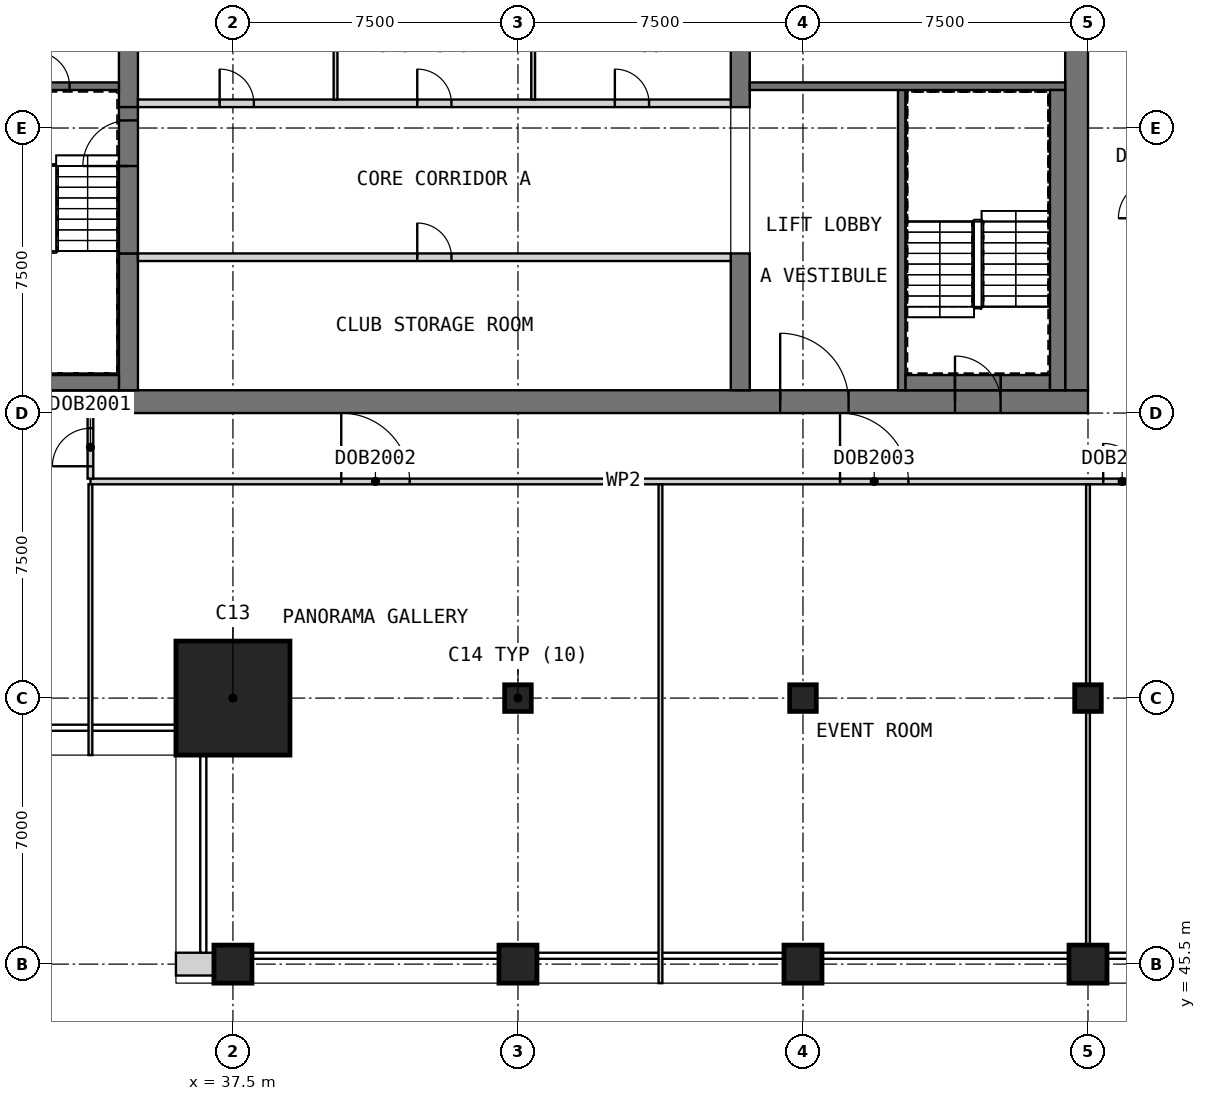
"""IFC4 building model, lengths in metres.
Left out: names, types, materials, properties, quantities, classifications, styles, units other than length and angle.
Written with IfcOpenShell. Run it as: python <this file> out.ifc"""

import sys

from ifc_helpers import new_model, si_unit, direction, frame, frame_2d, origin, origin_2d, place, context, subcontext, project, spatial, rectangle, extrude, element, fill, save


model = new_model("IFC4")
c1 = context("Model", 3, precision=1e-05, world=origin(), true_north=direction((0.0, 1.0)))
c2 = subcontext(c1, "Body", "Model", "MODEL_VIEW")
j1 = project(units=[si_unit("LENGTHUNIT", "METRE"), si_unit("PLANEANGLEUNIT", "RADIAN")], contexts=[c1])
p1 = place(None, origin())
s1 = spatial("IfcSite", under=j1, at=p1, CompositionType="ELEMENT")
p2 = place(p1, origin())
s2 = spatial("IfcBuilding", under=s1, at=p2, CompositionType="ELEMENT")
p3 = place(p2, frame((0.0, 0.0, 308.7)))
s3 = spatial("IfcBuildingStorey", under=s2, at=p3, CompositionType="ELEMENT", Elevation=308.7)
for number, where, z_axis, x_axis in (
    (1, (37.5, 45.5, 0.0), (0.0, 0.0, 1.0), (1.0, 0.0, 0.0)),
    (2, (45.0, 45.5, 0.0), (0.0, 0.0, 1.0), (1.0, 0.0, 0.0)),
):
    element("IfcColumn", number, at=place(p3, frame(where, z_axis=z_axis, x_axis=x_axis)), inside=s3, PredefinedType="COLUMN", context=c2, shape_type="SweptSolid", body=[
        extrude(rectangle(XDim=1.0, YDim=1.0, at=origin_2d()), origin(), (0.0, 0.0, 1.0), 6.0),
    ])
p4 = place(p3, frame((45.0, 52.5, 0.0), z_axis=(0.0, 0.0, 1.0), x_axis=(1.0, 0.0, 0.0)))
e3 = element("IfcColumn", 3, at=p4, inside=s3, PredefinedType="COLUMN", context=c2, shape_type="SweptSolid", body=[
    extrude(rectangle(XDim=0.7, YDim=0.7, at=origin_2d()), origin(), (0.0, 0.0, 1.0), 6.0),
])
p5 = place(p3, frame((52.5, 45.5, 0.0), z_axis=(0.0, 0.0, 1.0), x_axis=(1.0, 0.0, 0.0)))
e4 = element("IfcColumn", 4, at=p5, inside=s3, PredefinedType="COLUMN", context=c2, shape_type="SweptSolid", body=[
    extrude(rectangle(XDim=1.0, YDim=1.0, at=origin_2d()), origin(), (0.0, 0.0, 1.0), 6.0),
])
p6 = place(p3, frame((52.5, 52.5, 0.0), z_axis=(0.0, 0.0, 1.0), x_axis=(1.0, 0.0, 0.0)))
e5 = element("IfcColumn", 5, at=p6, inside=s3, PredefinedType="COLUMN", context=c2, shape_type="SweptSolid", body=[
    extrude(rectangle(XDim=0.7, YDim=0.7, at=origin_2d()), origin(), (0.0, 0.0, 1.0), 6.0),
])
p7 = place(p3, frame((60.0, 45.5, 0.0), z_axis=(0.0, 0.0, 1.0), x_axis=(1.0, 0.0, 0.0)))
e6 = element("IfcColumn", 6, at=p7, inside=s3, PredefinedType="COLUMN", context=c2, shape_type="SweptSolid", body=[
    extrude(rectangle(XDim=1.0, YDim=1.0, at=origin_2d()), origin(), (0.0, 0.0, 1.0), 6.0),
])
p8 = place(p3, frame((60.0, 52.5, 0.0), z_axis=(0.0, 0.0, 1.0), x_axis=(1.0, 0.0, 0.0)))
e7 = element("IfcColumn", 7, at=p8, inside=s3, PredefinedType="COLUMN", context=c2, shape_type="SweptSolid", body=[
    extrude(rectangle(XDim=0.7, YDim=0.7, at=origin_2d()), origin(), (0.0, 0.0, 1.0), 6.0),
])
p9 = place(p3, frame((37.5, 52.5, 0.0), z_axis=(0.0, 0.0, 1.0), x_axis=(1.0, 0.0, 0.0)))
e8 = element("IfcColumn", 8, at=p9, inside=s3, PredefinedType="COLUMN", context=c2, shape_type="SweptSolid", body=[
    extrude(rectangle(XDim=3.0, YDim=3.0, at=origin_2d()), origin(), (0.0, 0.0, 1.0), 6.0),
])
p10 = place(p3, frame((30.0, 60.3, 0.0), z_axis=(0.0, 0.0, 1.0), x_axis=(1.0, 0.0, 0.0)))
e9 = element("IfcWall", 9, at=p10, inside=s3, PredefinedType="SHEAR", context=c2, shape_type="SweptSolid", body=[
    extrude(rectangle(XDim=30.0, YDim=0.6, at=frame_2d((15.0, 0.0))), origin(), (0.0, 0.0, 1.0), 6.0),
])
p11 = place(p10, frame((21.9, 0.0, 0.0)))
e10 = element("IfcOpeningElement", 10, at=p11, cuts=e9, PredefinedType="OPENING", context=c2, shape_type="SweptSolid", body=[
    extrude(rectangle(XDim=1.8, YDim=2.1, at=frame_2d((0.9, 1.05))), frame((0.0, 0.31, 0.0), z_axis=(0.0, -1.0, 0.0), x_axis=(1.0, 0.0, 0.0)), (0.0, 0.0, 1.0), 0.62),
])
p12 = place(p10, frame((26.5, 0.0, 0.0)))
e11 = element("IfcOpeningElement", 11, at=p12, cuts=e9, PredefinedType="OPENING", context=c2, shape_type="SweptSolid", body=[
    extrude(rectangle(XDim=1.2, YDim=2.1, at=frame_2d((0.6, 1.05))), frame((0.0, 0.31, 0.0), z_axis=(0.0, -1.0, 0.0), x_axis=(1.0, 0.0, 0.0)), (0.0, 0.0, 1.0), 0.62),
])
p13 = place(p3, frame((59.7, 60.6, 0.0), z_axis=(0.0, 0.0, 1.0), x_axis=(0.0, 1.0, 0.0)))
e12 = element("IfcWall", 12, at=p13, inside=s3, PredefinedType="SHEAR", context=c2, shape_type="SweptSolid", body=[
    extrude(rectangle(XDim=21.3, YDim=0.6, at=frame_2d((10.65, 0.0))), origin(), (0.0, 0.0, 1.0), 6.0),
])
p14 = place(p13, frame((14.9, 0.0, 0.0)))
e13 = element("IfcOpeningElement", 13, at=p14, cuts=e12, PredefinedType="OPENING", context=c2, shape_type="SweptSolid", body=[
    extrude(rectangle(XDim=1.8, YDim=2.1, at=frame_2d((0.9, 1.05))), frame((0.0, 0.31, 0.0), z_axis=(0.0, -1.0, 0.0), x_axis=(1.0, 0.0, 0.0)), (0.0, 0.0, 1.0), 0.62),
])
p15 = place(p3, frame((34.75, 60.6, 0.0), z_axis=(0.0, 0.0, 1.0), x_axis=(0.0, 1.0, 0.0)))
e14 = element("IfcWall", 14, at=p15, inside=s3, PredefinedType="SHEAR", context=c2, shape_type="SweptSolid", body=[
    extrude(rectangle(XDim=3.6, YDim=0.5, at=frame_2d((1.8, 0.0))), origin(), (0.0, 0.0, 1.0), 6.0),
])
p16 = place(p3, frame((34.75, 68.05, 0.0), z_axis=(0.0, 0.0, 1.0), x_axis=(0.0, 1.0, 0.0)))
e15 = element("IfcWall", 15, at=p16, inside=s3, PredefinedType="SHEAR", context=c2, shape_type="SweptSolid", body=[
    extrude(rectangle(XDim=6.4, YDim=0.5, at=frame_2d((3.2, 0.0))), origin(), (0.0, 0.0, 1.0), 6.0),
])
p17 = place(p3, frame((50.85, 60.6, 0.0), z_axis=(0.0, 0.0, 1.0), x_axis=(0.0, 1.0, 0.0)))
e16 = element("IfcWall", 16, at=p17, inside=s3, PredefinedType="SHEAR", context=c2, shape_type="SweptSolid", body=[
    extrude(rectangle(XDim=3.6, YDim=0.5, at=frame_2d((1.8, 0.0))), origin(), (0.0, 0.0, 1.0), 6.0),
])
p18 = place(p3, frame((50.85, 68.05, 0.0), z_axis=(0.0, 0.0, 1.0), x_axis=(0.0, 1.0, 0.0)))
e17 = element("IfcWall", 17, at=p18, inside=s3, PredefinedType="SHEAR", context=c2, shape_type="SweptSolid", body=[
    extrude(rectangle(XDim=6.4, YDim=0.5, at=frame_2d((3.2, 0.0))), origin(), (0.0, 0.0, 1.0), 6.0),
])
p19 = place(p3, frame((36.0, 45.5, 0.0), z_axis=(0.0, 0.0, 1.0), x_axis=(1.0, 0.0, 0.0)))
e18 = element("IfcWall", 18, at=p19, inside=s3, PredefinedType="SOLIDWALL", context=c2, shape_type="SweptSolid", body=[
    extrude(rectangle(XDim=1.0, YDim=0.6, at=frame_2d((0.5, 0.0))), origin(), (0.0, 0.0, 1.0), 5.6),
])
p20 = place(p3, frame((35.0, 64.1, 0.0), z_axis=(0.0, 0.0, 1.0), x_axis=(1.0, 0.0, 0.0)))
e19 = element("IfcWall", 19, at=p20, inside=s3, PredefinedType="PARTITIONING", context=c2, shape_type="SweptSolid", body=[
    extrude(rectangle(XDim=15.6, YDim=0.2, at=frame_2d((7.8, 0.0))), origin(), (0.0, 0.0, 1.0), 5.59),
])
p21 = place(p20, frame((7.35, 0.0, 0.0)))
e20 = element("IfcOpeningElement", 20, at=p21, cuts=e19, PredefinedType="OPENING", context=c2, shape_type="SweptSolid", body=[
    extrude(rectangle(XDim=0.9, YDim=2.1, at=frame_2d((0.45, 1.05))), frame((0.0, 0.11, 0.0), z_axis=(0.0, -1.0, 0.0), x_axis=(1.0, 0.0, 0.0)), (0.0, 0.0, 1.0), 0.22),
])
p22 = place(p3, frame((35.0, 68.15, 0.0), z_axis=(0.0, 0.0, 1.0), x_axis=(1.0, 0.0, 0.0)))
e21 = element("IfcWall", 21, at=p22, inside=s3, PredefinedType="PARTITIONING", context=c2, shape_type="SweptSolid", body=[
    extrude(rectangle(XDim=15.6, YDim=0.2, at=frame_2d((7.8, 0.0))), origin(), (0.0, 0.0, 1.0), 5.59),
])
p23 = place(p22, frame((2.15, 0.0, 0.0)))
e22 = element("IfcOpeningElement", 22, at=p23, cuts=e21, PredefinedType="OPENING", context=c2, shape_type="SweptSolid", body=[
    extrude(rectangle(XDim=0.9, YDim=2.1, at=frame_2d((0.45, 1.05))), frame((0.0, 0.11, 0.0), z_axis=(0.0, -1.0, 0.0), x_axis=(1.0, 0.0, 0.0)), (0.0, 0.0, 1.0), 0.22),
])
p24 = place(p22, frame((7.35, 0.0, 0.0)))
e23 = element("IfcOpeningElement", 23, at=p24, cuts=e21, PredefinedType="OPENING", context=c2, shape_type="SweptSolid", body=[
    extrude(rectangle(XDim=0.9, YDim=2.1, at=frame_2d((0.45, 1.05))), frame((0.0, 0.11, 0.0), z_axis=(0.0, -1.0, 0.0), x_axis=(1.0, 0.0, 0.0)), (0.0, 0.0, 1.0), 0.22),
])
p25 = place(p22, frame((12.55, 0.0, 0.0)))
e24 = element("IfcOpeningElement", 24, at=p25, cuts=e21, PredefinedType="OPENING", context=c2, shape_type="SweptSolid", body=[
    extrude(rectangle(XDim=0.9, YDim=2.1, at=frame_2d((0.45, 1.05))), frame((0.0, 0.11, 0.0), z_axis=(0.0, -1.0, 0.0), x_axis=(1.0, 0.0, 0.0)), (0.0, 0.0, 1.0), 0.22),
])
for number, where, z_axis, x_axis in (
    (25, (40.2, 68.25, 0.0), (0.0, 0.0, 1.0), (0.0, 1.0, 0.0)),
    (26, (45.4, 68.25, 0.0), (0.0, 0.0, 1.0), (0.0, 1.0, 0.0)),
):
    element("IfcWall", number, at=place(p3, frame(where, z_axis=z_axis, x_axis=x_axis)), inside=s3, PredefinedType="PARTITIONING", context=c2, shape_type="SweptSolid", body=[
        extrude(rectangle(XDim=2.75, YDim=0.1, at=frame_2d((1.375, 0.0))), origin(), (0.0, 0.0, 1.0), 5.59),
    ])
p26 = place(p3, frame((34.75, 64.2, 0.0), z_axis=(0.0, 0.0, 1.0), x_axis=(0.0, 1.0, 0.0)))
e27 = element("IfcWall", 27, at=p26, inside=s3, PredefinedType="SOLIDWALL", context=c2, shape_type="SweptSolid", body=[
    extrude(rectangle(XDim=3.85, YDim=0.5, at=frame_2d((1.925, 0.0))), origin(), (0.0, 0.0, 1.0), 4.8),
])
p27 = place(p26, frame((2.3, 0.0, 0.0)))
e28 = element("IfcOpeningElement", 28, at=p27, cuts=e27, PredefinedType="OPENING", context=c2, shape_type="SweptSolid", body=[
    extrude(rectangle(XDim=1.2, YDim=2.1, at=frame_2d((0.6, 1.05))), frame((0.0, 0.26, 0.0), z_axis=(0.0, -1.0, 0.0), x_axis=(1.0, 0.0, 0.0)), (0.0, 0.0, 1.0), 0.52),
])
p28 = place(p3, frame((30.6, 68.6, 0.0), z_axis=(0.0, 0.0, 1.0), x_axis=(1.0, 0.0, 0.0)))
e29 = element("IfcWall", 29, at=p28, inside=s3, PredefinedType="SOLIDWALL", context=c2, shape_type="SweptSolid", body=[
    extrude(rectangle(XDim=3.9, YDim=0.2, at=frame_2d((1.95, 0.0))), origin(), (0.0, 0.0, 1.0), 5.59),
])
p29 = place(p28, frame((1.7, 0.0, 0.0)))
e30 = element("IfcOpeningElement", 30, at=p29, cuts=e29, PredefinedType="OPENING", context=c2, shape_type="SweptSolid", body=[
    extrude(rectangle(XDim=0.9, YDim=2.1, at=frame_2d((0.45, 1.05))), frame((0.0, 0.11, 0.0), z_axis=(0.0, -1.0, 0.0), x_axis=(1.0, 0.0, 0.0)), (0.0, 0.0, 1.0), 0.22),
])
p30 = place(p3, frame((55.1, 60.6, 0.0), z_axis=(0.0, 0.0, 1.0), x_axis=(0.0, 1.0, 0.0)))
e31 = element("IfcWall", 31, at=p30, inside=s3, PredefinedType="SOLIDWALL", context=c2, shape_type="SweptSolid", body=[
    extrude(rectangle(XDim=8.0, YDim=0.2, at=frame_2d((4.0, 0.0))), origin(), (0.0, 0.0, 1.0), 5.59),
])
p31 = place(p3, frame((51.1, 68.6, 0.0), z_axis=(0.0, 0.0, 1.0), x_axis=(1.0, 0.0, 0.0)))
e32 = element("IfcWall", 32, at=p31, inside=s3, PredefinedType="SOLIDWALL", context=c2, shape_type="SweptSolid", body=[
    extrude(rectangle(XDim=8.3, YDim=0.2, at=frame_2d((4.15, 0.0))), origin(), (0.0, 0.0, 1.0), 5.59),
])
p32 = place(p3, frame((31.0, 60.8, 0.0), z_axis=(0.0, 0.0, 1.0), x_axis=(1.0, 0.0, 0.0)))
e33 = element("IfcWall", 33, at=p32, inside=s3, PredefinedType="SOLIDWALL", context=c2, shape_type="SweptSolid", body=[
    extrude(rectangle(XDim=3.5, YDim=0.4, at=frame_2d((1.75, 0.0))), origin(), (0.0, 0.0, 1.0), 5.59),
])
for number, where, z_axis, x_axis in (
    (34, (55.2, 60.8, 0.0), (0.0, 0.0, 1.0), (1.0, 0.0, 0.0)),
    (35, (57.7, 60.8, 0.0), (0.0, 0.0, 1.0), (1.0, 0.0, 0.0)),
):
    element("IfcWall", number, at=place(p3, frame(where, z_axis=z_axis, x_axis=x_axis)), inside=s3, PredefinedType="SOLIDWALL", context=c2, shape_type="SweptSolid", body=[
        extrude(rectangle(XDim=1.3, YDim=0.4, at=frame_2d((0.65, 0.0))), origin(), (0.0, 0.0, 1.0), 5.59),
    ])
p33 = place(p3, frame((59.2, 60.6, 0.0), z_axis=(0.0, 0.0, 1.0), x_axis=(0.0, 1.0, 0.0)))
e36 = element("IfcWall", 36, at=p33, inside=s3, PredefinedType="SOLIDWALL", context=c2, shape_type="SweptSolid", body=[
    extrude(rectangle(XDim=7.9, YDim=0.4, at=frame_2d((3.95, 0.0))), origin(), (0.0, 0.0, 1.0), 5.59),
])
p34 = place(p3, frame((56.5, 60.8, 3.24), z_axis=(0.0, 0.0, 1.0), x_axis=(1.0, 0.0, 0.0)))
e37 = element("IfcWall", 37, at=p34, inside=s3, PredefinedType="SOLIDWALL", context=c2, shape_type="SweptSolid", body=[
    extrude(rectangle(XDim=1.2, YDim=0.4, at=frame_2d((0.6, 0.0))), origin(), (0.0, 0.0, 1.0), 2.35),
])
p35 = place(p3, frame((33.75, 58.2, 0.0), z_axis=(0.0, 0.0, 1.0), x_axis=(1.0, 0.0, 0.0)))
e38 = element("IfcWall", 38, at=p35, inside=s3, PredefinedType="PARTITIONING", context=c2, shape_type="SweptSolid", body=[
    extrude(rectangle(XDim=28.05, YDim=0.15, at=frame_2d((14.025, 0.0))), origin(), (0.0, 0.0, 1.0), 5.6),
])
p36 = place(p35, frame((6.6, 0.0, 0.0)))
e39 = element("IfcOpeningElement", 39, at=p36, cuts=e38, PredefinedType="OPENING", context=c2, shape_type="SweptSolid", body=[
    extrude(rectangle(XDim=1.8, YDim=2.1, at=frame_2d((0.9, 1.05))), frame((0.0, 0.085, 0.0), z_axis=(0.0, -1.0, 0.0), x_axis=(1.0, 0.0, 0.0)), (0.0, 0.0, 1.0), 0.17),
])
p37 = place(p35, frame((19.725, 0.0, 0.0)))
e40 = element("IfcOpeningElement", 40, at=p37, cuts=e38, PredefinedType="OPENING", context=c2, shape_type="SweptSolid", body=[
    extrude(rectangle(XDim=1.8, YDim=2.1, at=frame_2d((0.9, 1.05))), frame((0.0, 0.085, 0.0), z_axis=(0.0, -1.0, 0.0), x_axis=(1.0, 0.0, 0.0)), (0.0, 0.0, 1.0), 0.17),
])
p38 = place(p35, frame((26.65, 0.0, 0.0)))
e41 = element("IfcOpeningElement", 41, at=p38, cuts=e38, PredefinedType="OPENING", context=c2, shape_type="SweptSolid", body=[
    extrude(rectangle(XDim=1.0, YDim=2.1, at=frame_2d((0.5, 1.05))), frame((0.0, 0.085, 0.0), z_axis=(0.0, -1.0, 0.0), x_axis=(1.0, 0.0, 0.0)), (0.0, 0.0, 1.0), 0.17),
])
p39 = place(p3, frame((33.75, 58.275, 0.0), z_axis=(0.0, 0.0, 1.0), x_axis=(0.0, 1.0, 0.0)))
e42 = element("IfcWall", 42, at=p39, inside=s3, PredefinedType="PARTITIONING", context=c2, shape_type="SweptSolid", body=[
    extrude(rectangle(XDim=1.725, YDim=0.15, at=frame_2d((0.863, 0.0))), origin(), (0.0, 0.0, 1.0), 5.6),
])
p40 = place(p39, frame((0.325, 0.0, 0.0)))
e43 = element("IfcOpeningElement", 43, at=p40, cuts=e42, PredefinedType="OPENING", context=c2, shape_type="SweptSolid", body=[
    extrude(rectangle(XDim=1.0, YDim=2.1, at=frame_2d((0.5, 1.05))), frame((0.0, 0.085, 0.0), z_axis=(0.0, -1.0, 0.0), x_axis=(1.0, 0.0, 0.0)), (0.0, 0.0, 1.0), 0.17),
])
p41 = place(p3, frame((33.75, 51.0, 0.0), z_axis=(0.0, 0.0, 1.0), x_axis=(0.0, 1.0, 0.0)))
e44 = element("IfcWall", 44, at=p41, inside=s3, PredefinedType="PARTITIONING", context=c2, shape_type="SweptSolid", body=[
    extrude(rectangle(XDim=7.125, YDim=0.1, at=frame_2d((3.562, 0.0))), origin(), (0.0, 0.0, 1.0), 5.6),
])
for number, where, z_axis, x_axis in (
    (45, (48.75, 45.0, 0.0), (0.0, 0.0, 1.0), (0.0, 1.0, 0.0)),
    (46, (60.0, 45.0, 0.0), (0.0, 0.0, 1.0), (0.0, 1.0, 0.0)),
):
    element("IfcWall", number, at=place(p3, frame(where, z_axis=z_axis, x_axis=x_axis)), inside=s3, PredefinedType="PARTITIONING", context=c2, shape_type="SweptSolid", body=[
        extrude(rectangle(XDim=13.125, YDim=0.1, at=frame_2d((6.562, 0.0))), origin(), (0.0, 0.0, 1.0), 5.6),
    ])
p42 = place(p21, origin())
e47 = element("IfcDoor", 47, at=p42, inside=s3, OperationType="SINGLE_SWING_RIGHT", PredefinedType="DOOR", context=c2, shape_type="SweptSolid", body=[
    extrude(rectangle(XDim=0.9, YDim=2.1, at=frame_2d((0.45, 1.05))), frame((0.0, 0.025, 0.0), z_axis=(0.0, -1.0, 0.0), x_axis=(1.0, 0.0, 0.0)), (0.0, 0.0, 1.0), 0.05),
])
fill(e20, e47)
p43 = place(p23, origin())
e48 = element("IfcDoor", 48, at=p43, inside=s3, OperationType="SINGLE_SWING_RIGHT", PredefinedType="DOOR", context=c2, shape_type="SweptSolid", body=[
    extrude(rectangle(XDim=0.9, YDim=2.1, at=frame_2d((0.45, 1.05))), frame((0.0, 0.025, 0.0), z_axis=(0.0, -1.0, 0.0), x_axis=(1.0, 0.0, 0.0)), (0.0, 0.0, 1.0), 0.05),
])
fill(e22, e48)
p44 = place(p24, origin())
e49 = element("IfcDoor", 49, at=p44, inside=s3, OperationType="SINGLE_SWING_LEFT", PredefinedType="DOOR", context=c2, shape_type="SweptSolid", body=[
    extrude(rectangle(XDim=0.9, YDim=2.1, at=frame_2d((0.45, 1.05))), frame((0.0, 0.025, 0.0), z_axis=(0.0, -1.0, 0.0), x_axis=(1.0, 0.0, 0.0)), (0.0, 0.0, 1.0), 0.05),
])
fill(e23, e49)
p45 = place(p25, origin())
e50 = element("IfcDoor", 50, at=p45, inside=s3, OperationType="SINGLE_SWING_RIGHT", PredefinedType="DOOR", context=c2, shape_type="SweptSolid", body=[
    extrude(rectangle(XDim=0.9, YDim=2.1, at=frame_2d((0.45, 1.05))), frame((0.0, 0.025, 0.0), z_axis=(0.0, -1.0, 0.0), x_axis=(1.0, 0.0, 0.0)), (0.0, 0.0, 1.0), 0.05),
])
fill(e24, e50)
p46 = place(p11, origin())
e51 = element("IfcDoor", 51, at=p46, inside=s3, OperationType="DOUBLE_DOOR_SINGLE_SWING", PredefinedType="DOOR", context=c2, shape_type="SweptSolid", body=[
    extrude(rectangle(XDim=1.8, YDim=2.1, at=frame_2d((0.9, 1.05))), frame((0.0, 0.025, 0.0), z_axis=(0.0, -1.0, 0.0), x_axis=(1.0, 0.0, 0.0)), (0.0, 0.0, 1.0), 0.05),
])
fill(e10, e51)
p47 = place(p27, origin())
e52 = element("IfcDoor", 52, at=p47, inside=s3, OperationType="SINGLE_SWING_LEFT", PredefinedType="DOOR", context=c2, shape_type="SweptSolid", body=[
    extrude(rectangle(XDim=1.2, YDim=2.1, at=frame_2d((0.6, 1.05))), frame((0.0, 0.025, 0.0), z_axis=(0.0, -1.0, 0.0), x_axis=(1.0, 0.0, 0.0)), (0.0, 0.0, 1.0), 0.05),
])
fill(e28, e52)
p48 = place(p29, origin())
e53 = element("IfcDoor", 53, at=p48, inside=s3, OperationType="SINGLE_SWING_LEFT", PredefinedType="DOOR", context=c2, shape_type="SweptSolid", body=[
    extrude(rectangle(XDim=0.9, YDim=2.1, at=frame_2d((0.45, 1.05))), frame((0.0, 0.025, 0.0), z_axis=(0.0, -1.0, 0.0), x_axis=(1.0, 0.0, 0.0)), (0.0, 0.0, 1.0), 0.05),
])
fill(e30, e53)
p49 = place(p12, origin())
e54 = element("IfcDoor", 54, at=p49, inside=s3, OperationType="SINGLE_SWING_LEFT", PredefinedType="DOOR", context=c2, shape_type="SweptSolid", body=[
    extrude(rectangle(XDim=1.2, YDim=2.1, at=frame_2d((0.6, 1.05))), frame((0.0, 0.025, 0.0), z_axis=(0.0, -1.0, 0.0), x_axis=(1.0, 0.0, 0.0)), (0.0, 0.0, 1.0), 0.05),
])
fill(e11, e54)
p50 = place(p40, origin())
e55 = element("IfcDoor", 55, at=p50, inside=s3, OperationType="SINGLE_SWING_RIGHT", PredefinedType="DOOR", context=c2, shape_type="SweptSolid", body=[
    extrude(rectangle(XDim=1.0, YDim=2.1, at=frame_2d((0.5, 1.05))), frame((0.0, 0.025, 0.0), z_axis=(0.0, -1.0, 0.0), x_axis=(1.0, 0.0, 0.0)), (0.0, 0.0, 1.0), 0.05),
])
fill(e43, e55)
p51 = place(p36, origin())
e56 = element("IfcDoor", 56, at=p51, inside=s3, OperationType="DOUBLE_DOOR_SINGLE_SWING", PredefinedType="DOOR", context=c2, shape_type="SweptSolid", body=[
    extrude(rectangle(XDim=1.8, YDim=2.1, at=frame_2d((0.9, 1.05))), frame((0.0, 0.025, 0.0), z_axis=(0.0, -1.0, 0.0), x_axis=(1.0, 0.0, 0.0)), (0.0, 0.0, 1.0), 0.05),
])
fill(e39, e56)
p52 = place(p37, origin())
e57 = element("IfcDoor", 57, at=p52, inside=s3, OperationType="DOUBLE_DOOR_SINGLE_SWING", PredefinedType="DOOR", context=c2, shape_type="SweptSolid", body=[
    extrude(rectangle(XDim=1.8, YDim=2.1, at=frame_2d((0.9, 1.05))), frame((0.0, 0.025, 0.0), z_axis=(0.0, -1.0, 0.0), x_axis=(1.0, 0.0, 0.0)), (0.0, 0.0, 1.0), 0.05),
])
fill(e40, e57)
p53 = place(p38, origin())
e58 = element("IfcDoor", 58, at=p53, inside=s3, OperationType="SINGLE_SWING_RIGHT", PredefinedType="DOOR", context=c2, shape_type="SweptSolid", body=[
    extrude(rectangle(XDim=1.0, YDim=2.1, at=frame_2d((0.5, 1.05))), frame((0.0, 0.025, 0.0), z_axis=(0.0, -1.0, 0.0), x_axis=(1.0, 0.0, 0.0)), (0.0, 0.0, 1.0), 0.05),
])
fill(e41, e58)
save(model, sys.argv[1])
